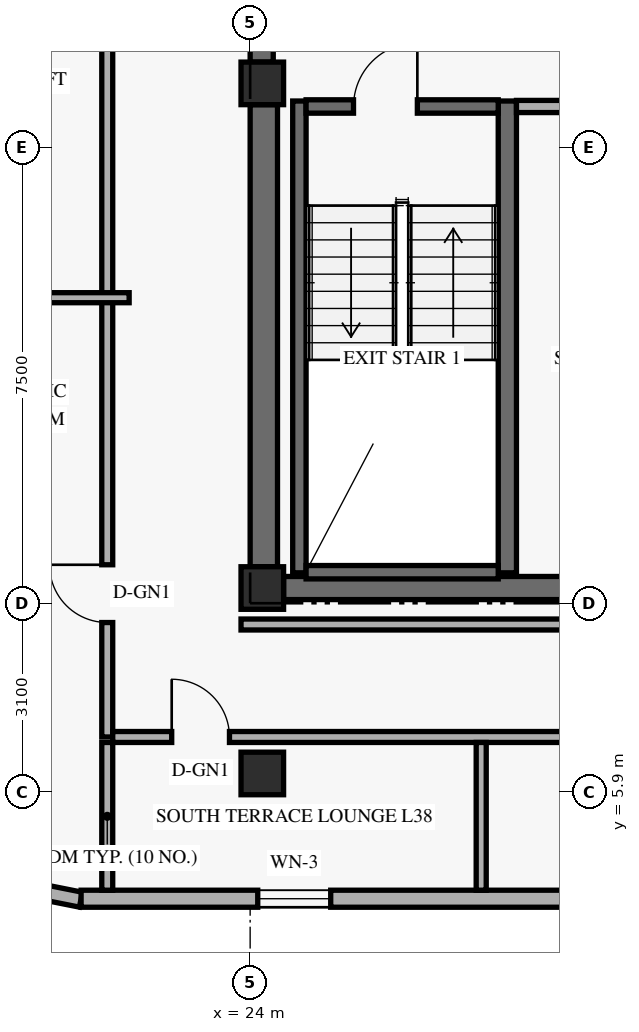
"""IFC4 building model, lengths in metres.
Left out: names, types, materials, properties, quantities, classifications, styles, units other than length and angle.
Written with IfcOpenShell. Run it as: python <this file> out.ifc"""

import sys

from ifc_helpers import new_model, si_unit, direction, frame, frame_2d, origin, origin_2d, place, context, subcontext, project, spatial, rectangle, extrude, element, fill, save


model = new_model("IFC4")
c1 = context("Model", 3, precision=1e-05, world=origin(), true_north=direction((0.0, 1.0)))
c2 = subcontext(c1, "Body", "Model", "MODEL_VIEW")
j1 = project(units=[si_unit("LENGTHUNIT", "METRE"), si_unit("PLANEANGLEUNIT", "RADIAN")], contexts=[c1])
p1 = place(None, origin())
s1 = spatial("IfcSite", under=j1, at=p1, CompositionType="ELEMENT")
p2 = place(p1, origin())
s2 = spatial("IfcBuilding", under=s1, at=p2, CompositionType="ELEMENT")
p3 = place(p2, frame((0.0, 0.0, 148.2)))
s3 = spatial("IfcBuildingStorey", under=s2, at=p3, CompositionType="ELEMENT", Elevation=148.2)
p4 = place(p3, frame((24.225, 9.6, 0.0), z_axis=(0.0, 0.0, 1.0), x_axis=(0.0, 1.0, 0.0)))
e1 = element("IfcWall", 1, at=p4, inside=s3, PredefinedType="SHEAR", context=c2, shape_type="SweptSolid", body=[
    extrude(rectangle(XDim=7.6, YDim=0.45, at=frame_2d((3.8, 0.0))), origin(), (0.0, 0.0, 1.0), 2.748),
])
p5 = place(p3, frame((24.19, 17.9, 0.0), z_axis=(0.0, 0.0, 1.0), x_axis=(0.0, 1.0, 0.0)))
e2 = element("IfcWall", 2, at=p5, inside=s3, PredefinedType="SHEAR", context=c2, shape_type="SweptSolid", body=[
    extrude(rectangle(XDim=11.95, YDim=0.38, at=frame_2d((5.975, 0.0))), origin(), (0.0, 0.0, 1.0), 2.748),
])
p6 = place(p3, frame((24.55, 9.25, 0.0), z_axis=(0.0, 0.0, 1.0), x_axis=(1.0, 0.0, 0.0)))
e3 = element("IfcWall", 3, at=p6, inside=s3, PredefinedType="SHEAR", context=c2, shape_type="SweptSolid", body=[
    extrude(rectangle(XDim=10.3, YDim=0.38, at=frame_2d((5.15, 0.0))), origin(), (0.0, 0.0, 1.0), 3.36),
])
p7 = place(p6, frame((5.2, 0.0, 0.0)))
e4 = element("IfcOpeningElement", 4, at=p7, cuts=e3, PredefinedType="OPENING", context=c2, shape_type="SweptSolid", body=[
    extrude(rectangle(XDim=1.05, YDim=2.15, at=frame_2d((0.525, 1.075))), frame((0.0, 0.2, 0.0), z_axis=(0.0, -1.0, 0.0), x_axis=(1.0, 0.0, 0.0)), (0.0, 0.0, 1.0), 0.4),
])
p8 = place(p3, frame((24.81, 9.5, 0.0), z_axis=(0.0, 0.0, 1.0), x_axis=(0.0, 1.0, 0.0)))
e5 = element("IfcWall", 5, at=p8, inside=s3, PredefinedType="SHEAR", context=c2, shape_type="SweptSolid", body=[
    extrude(rectangle(XDim=7.76, YDim=0.22, at=frame_2d((3.88, 0.0))), origin(), (0.0, 0.0, 1.0), 3.36),
])
p9 = place(p3, frame((28.23, 9.5, 0.0), z_axis=(0.0, 0.0, 1.0), x_axis=(0.0, 1.0, 0.0)))
e6 = element("IfcWall", 6, at=p9, inside=s3, PredefinedType="SHEAR", context=c2, shape_type="SweptSolid", body=[
    extrude(rectangle(XDim=7.76, YDim=0.3, at=frame_2d((3.88, 0.0))), origin(), (0.0, 0.0, 1.0), 3.36),
])
p10 = place(p3, frame((24.92, 9.51, 0.0), z_axis=(0.0, 0.0, 1.0), x_axis=(1.0, 0.0, 0.0)))
e7 = element("IfcWall", 7, at=p10, inside=s3, PredefinedType="SHEAR", context=c2, shape_type="SweptSolid", body=[
    extrude(rectangle(XDim=3.16, YDim=0.22, at=frame_2d((1.58, 0.0))), origin(), (0.0, 0.0, 1.0), 3.36),
])
p11 = place(p3, frame((24.92, 17.17, 0.0), z_axis=(0.0, 0.0, 1.0), x_axis=(1.0, 0.0, 0.0)))
e8 = element("IfcWall", 8, at=p11, inside=s3, PredefinedType="SHEAR", context=c2, shape_type="SweptSolid", body=[
    extrude(rectangle(XDim=3.16, YDim=0.22, at=frame_2d((1.58, 0.0))), origin(), (0.0, 0.0, 1.0), 3.36),
])
p12 = place(p11, frame((0.78, 0.0, 0.0)))
e9 = element("IfcOpeningElement", 9, at=p12, cuts=e8, PredefinedType="OPENING", context=c2, shape_type="SweptSolid", body=[
    extrude(rectangle(XDim=1.05, YDim=2.15, at=frame_2d((0.525, 1.075))), frame((0.0, 0.12, 0.0), z_axis=(0.0, -1.0, 0.0), x_axis=(1.0, 0.0, 0.0)), (0.0, 0.0, 1.0), 0.24),
])
for number, where, z_axis, x_axis in (
    (10, (24.2, 6.2, 0.0), (0.0, 0.0, 1.0), (1.0, 0.0, 0.0)),
    (11, (24.2, 9.25, 0.0), (0.0, 0.0, 1.0), (1.0, 0.0, 0.0)),
    (12, (24.2, 17.55, 0.0), (0.0, 0.0, 1.0), (1.0, 0.0, 0.0)),
):
    element("IfcColumn", number, at=place(p3, frame(where, z_axis=z_axis, x_axis=x_axis)), inside=s3, PredefinedType="COLUMN", context=c2, shape_type="SweptSolid", body=[
        extrude(rectangle(XDim=0.7, YDim=0.7, at=origin_2d()), origin(), (0.0, 0.0, 1.0), 3.6),
    ])
p13 = place(p3, frame((19.854, 4.395, 0.0), z_axis=(0.0, 0.0, 1.0), x_axis=(0.980809899341, -0.19496651342, 0.0)))
e13 = element("IfcWall", 13, at=p13, inside=s3, PredefinedType="SOLIDWALL", context=c2, shape_type="SweptSolid", body=[
    extrude(rectangle(XDim=1.389, YDim=0.25, at=frame_2d((0.694, 0.0))), origin(), (0.0, 0.0, 1.0), 3.36),
])
p14 = place(p3, frame((21.22, 4.14, 0.0), z_axis=(0.0, 0.0, 1.0), x_axis=(1.0, 0.0, 0.0)))
e14 = element("IfcWall", 14, at=p14, inside=s3, PredefinedType="SOLIDWALL", context=c2, shape_type="SweptSolid", body=[
    extrude(rectangle(XDim=33.76, YDim=0.28, at=frame_2d((16.88, 0.0))), origin(), (0.0, 0.0, 1.0), 3.36),
])
p15 = place(p14, frame((2.905, 0.0, 0.85)))
e15 = element("IfcOpeningElement", 15, at=p15, cuts=e14, PredefinedType="OPENING", context=c2, shape_type="SweptSolid", body=[
    extrude(rectangle(XDim=1.2, YDim=1.5, at=frame_2d((0.6, 0.75))), frame((0.0, 0.15, 0.0), z_axis=(0.0, -1.0, 0.0), x_axis=(1.0, 0.0, 0.0)), (0.0, 0.0, 1.0), 0.3),
])
p16 = place(p14, frame((9.79, 0.0, 0.85)))
e16 = element("IfcOpeningElement", 16, at=p16, cuts=e14, PredefinedType="OPENING", context=c2, shape_type="SweptSolid", body=[
    extrude(rectangle(XDim=1.2, YDim=1.5, at=frame_2d((0.6, 0.75))), frame((0.0, 0.15, 0.0), z_axis=(0.0, -1.0, 0.0), x_axis=(1.0, 0.0, 0.0)), (0.0, 0.0, 1.0), 0.3),
])
p17 = place(p14, frame((15.065, 0.0, 0.85)))
e17 = element("IfcOpeningElement", 17, at=p17, cuts=e14, PredefinedType="OPENING", context=c2, shape_type="SweptSolid", body=[
    extrude(rectangle(XDim=1.2, YDim=1.5, at=frame_2d((0.6, 0.75))), frame((0.0, 0.15, 0.0), z_axis=(0.0, -1.0, 0.0), x_axis=(1.0, 0.0, 0.0)), (0.0, 0.0, 1.0), 0.3),
])
p18 = place(p14, frame((19.625, 0.0, 0.85)))
e18 = element("IfcOpeningElement", 18, at=p18, cuts=e14, PredefinedType="OPENING", context=c2, shape_type="SweptSolid", body=[
    extrude(rectangle(XDim=1.2, YDim=1.5, at=frame_2d((0.6, 0.75))), frame((0.0, 0.15, 0.0), z_axis=(0.0, -1.0, 0.0), x_axis=(1.0, 0.0, 0.0)), (0.0, 0.0, 1.0), 0.3),
])
p19 = place(p14, frame((24.45, 0.0, 0.85)))
e19 = element("IfcOpeningElement", 19, at=p19, cuts=e14, PredefinedType="OPENING", context=c2, shape_type="SweptSolid", body=[
    extrude(rectangle(XDim=1.2, YDim=1.5, at=frame_2d((0.6, 0.75))), frame((0.0, 0.15, 0.0), z_axis=(0.0, -1.0, 0.0), x_axis=(1.0, 0.0, 0.0)), (0.0, 0.0, 1.0), 0.3),
])
p20 = place(p14, frame((27.08, 0.0, 0.85)))
e20 = element("IfcOpeningElement", 20, at=p20, cuts=e14, PredefinedType="OPENING", context=c2, shape_type="SweptSolid", body=[
    extrude(rectangle(XDim=1.2, YDim=1.5, at=frame_2d((0.6, 0.75))), frame((0.0, 0.15, 0.0), z_axis=(0.0, -1.0, 0.0), x_axis=(1.0, 0.0, 0.0)), (0.0, 0.0, 1.0), 0.3),
])
p21 = place(p14, frame((30.57, 0.0, 0.85)))
e21 = element("IfcOpeningElement", 21, at=p21, cuts=e14, PredefinedType="OPENING", context=c2, shape_type="SweptSolid", body=[
    extrude(rectangle(XDim=1.2, YDim=1.5, at=frame_2d((0.6, 0.75))), frame((0.0, 0.15, 0.0), z_axis=(0.0, -1.0, 0.0), x_axis=(1.0, 0.0, 0.0)), (0.0, 0.0, 1.0), 0.3),
])
p22 = place(p3, frame((28.38, 17.17, 0.0), z_axis=(0.0, 0.0, 1.0), x_axis=(1.0, 0.0, 0.0)))
e22 = element("IfcWall", 22, at=p22, inside=s3, PredefinedType="STANDARD", context=c2, shape_type="SweptSolid", body=[
    extrude(rectangle(XDim=2.9, YDim=0.2, at=frame_2d((1.45, 0.0))), origin(), (0.0, 0.0, 1.0), 3.36),
])
p23 = place(p3, frame((21.65, 6.8, 0.0), z_axis=(0.0, 0.0, 1.0), x_axis=(0.0, 1.0, 0.0)))
e23 = element("IfcWall", 23, at=p23, inside=s3, PredefinedType="STANDARD", context=c2, shape_type="SweptSolid", body=[
    extrude(rectangle(XDim=34.4, YDim=0.18, at=frame_2d((17.2, 0.0))), origin(), (0.0, 0.0, 1.0), 2.73),
])
p24 = place(p23, frame((1.883, 0.0, 0.0)))
e24 = element("IfcOpeningElement", 24, at=p24, cuts=e23, PredefinedType="OPENING", context=c2, shape_type="SweptSolid", body=[
    extrude(rectangle(XDim=0.95, YDim=2.15, at=frame_2d((0.475, 1.075))), frame((0.0, 0.1, 0.0), z_axis=(0.0, -1.0, 0.0), x_axis=(1.0, 0.0, 0.0)), (0.0, 0.0, 1.0), 0.2),
])
p25 = place(p23, frame((12.117, 0.0, 0.0)))
e25 = element("IfcOpeningElement", 25, at=p25, cuts=e23, PredefinedType="OPENING", context=c2, shape_type="SweptSolid", body=[
    extrude(rectangle(XDim=0.95, YDim=2.15, at=frame_2d((0.475, 1.075))), frame((0.0, 0.1, 0.0), z_axis=(0.0, -1.0, 0.0), x_axis=(1.0, 0.0, 0.0)), (0.0, 0.0, 1.0), 0.2),
])
p26 = place(p23, frame((22.357, 0.0, 0.0)))
e26 = element("IfcOpeningElement", 26, at=p26, cuts=e23, PredefinedType="OPENING", context=c2, shape_type="SweptSolid", body=[
    extrude(rectangle(XDim=0.95, YDim=2.15, at=frame_2d((0.475, 1.075))), frame((0.0, 0.1, 0.0), z_axis=(0.0, -1.0, 0.0), x_axis=(1.0, 0.0, 0.0)), (0.0, 0.0, 1.0), 0.2),
])
p27 = place(p23, frame((31.792, 0.0, 0.0)))
e27 = element("IfcOpeningElement", 27, at=p27, cuts=e23, PredefinedType="OPENING", context=c2, shape_type="SweptSolid", body=[
    extrude(rectangle(XDim=0.95, YDim=2.15, at=frame_2d((0.475, 1.075))), frame((0.0, 0.1, 0.0), z_axis=(0.0, -1.0, 0.0), x_axis=(1.0, 0.0, 0.0)), (0.0, 0.0, 1.0), 0.2),
])
p28 = place(p3, frame((21.74, 6.8, 0.0), z_axis=(0.0, 0.0, 1.0), x_axis=(1.0, 0.0, 0.0)))
e28 = element("IfcWall", 28, at=p28, inside=s3, PredefinedType="STANDARD", context=c2, shape_type="SweptSolid", body=[
    extrude(rectangle(XDim=13.68, YDim=0.18, at=frame_2d((6.84, 0.0))), origin(), (0.0, 0.0, 1.0), 2.73),
])
p29 = place(p28, frame((0.97, 0.0, 0.0)))
e29 = element("IfcOpeningElement", 29, at=p29, cuts=e28, PredefinedType="OPENING", context=c2, shape_type="SweptSolid", body=[
    extrude(rectangle(XDim=0.95, YDim=2.15, at=frame_2d((0.475, 1.075))), frame((0.0, 0.1, 0.0), z_axis=(0.0, -1.0, 0.0), x_axis=(1.0, 0.0, 0.0)), (0.0, 0.0, 1.0), 0.2),
])
p30 = place(p28, frame((9.11, 0.0, 0.0)))
e30 = element("IfcOpeningElement", 30, at=p30, cuts=e28, PredefinedType="OPENING", context=c2, shape_type="SweptSolid", body=[
    extrude(rectangle(XDim=0.95, YDim=2.15, at=frame_2d((0.475, 1.075))), frame((0.0, 0.1, 0.0), z_axis=(0.0, -1.0, 0.0), x_axis=(1.0, 0.0, 0.0)), (0.0, 0.0, 1.0), 0.2),
])
p31 = place(p3, frame((23.85, 8.65, 0.0), z_axis=(0.0, 0.0, 1.0), x_axis=(1.0, 0.0, 0.0)))
e31 = element("IfcWall", 31, at=p31, inside=s3, PredefinedType="STANDARD", context=c2, shape_type="SweptSolid", body=[
    extrude(rectangle(XDim=11.57, YDim=0.18, at=frame_2d((5.785, 0.0))), origin(), (0.0, 0.0, 1.0), 2.73),
])
p32 = place(p3, frame((21.65, 4.28, 0.0), z_axis=(0.0, 0.0, 1.0), x_axis=(0.0, 1.0, 0.0)))
e32 = element("IfcWall", 32, at=p32, inside=s3, PredefinedType="PARTITIONING", context=c2, shape_type="SweptSolid", body=[
    extrude(rectangle(XDim=2.43, YDim=0.18, at=frame_2d((1.215, 0.0))), origin(), (0.0, 0.0, 1.0), 2.879),
])
p33 = place(p3, frame((17.88, 14.025, 0.0), z_axis=(0.0, 0.0, 1.0), x_axis=(1.0, 0.0, 0.0)))
e33 = element("IfcWall", 33, at=p33, inside=s3, PredefinedType="PARTITIONING", context=c2, shape_type="SweptSolid", body=[
    extrude(rectangle(XDim=4.13, YDim=0.165, at=frame_2d((2.065, 0.0))), origin(), (0.0, 0.0, 1.0), 2.879),
])
p34 = place(p3, frame((27.8, 4.28, 0.0), z_axis=(0.0, 0.0, 1.0), x_axis=(0.0, 1.0, 0.0)))
e34 = element("IfcWall", 34, at=p34, inside=s3, PredefinedType="PARTITIONING", context=c2, shape_type="SweptSolid", body=[
    extrude(rectangle(XDim=2.43, YDim=0.165, at=frame_2d((1.215, 0.0))), origin(), (0.0, 0.0, 1.0), 2.879),
])
p35 = place(p15, origin())
e35 = element("IfcWindow", 35, at=p35, inside=s3, PartitioningType="SINGLE_PANEL", PredefinedType="WINDOW", context=c2, shape_type="SweptSolid", body=[
    extrude(rectangle(XDim=1.2, YDim=1.5, at=frame_2d((0.6, 0.75))), frame((0.0, 0.03, 0.0), z_axis=(0.0, -1.0, 0.0), x_axis=(1.0, 0.0, 0.0)), (0.0, 0.0, 1.0), 0.06),
])
fill(e15, e35)
p36 = place(p12, frame((1.05, 0.0, 0.0), z_axis=(0.0, 0.0, 1.0), x_axis=(-1.0, 0.0, 0.0)))
e36 = element("IfcDoor", 36, at=p36, inside=s3, OperationType="SINGLE_SWING_LEFT", PredefinedType="DOOR", context=c2, shape_type="SweptSolid", body=[
    extrude(rectangle(XDim=1.05, YDim=2.15, at=frame_2d((0.525, 1.075))), frame((0.0, 0.025, 0.0), z_axis=(0.0, -1.0, 0.0), x_axis=(1.0, 0.0, 0.0)), (0.0, 0.0, 1.0), 0.05),
])
fill(e9, e36)
p37 = place(p24, origin())
e37 = element("IfcDoor", 37, at=p37, inside=s3, OperationType="SINGLE_SWING_RIGHT", PredefinedType="DOOR", context=c2, shape_type="SweptSolid", body=[
    extrude(rectangle(XDim=0.95, YDim=2.15, at=frame_2d((0.475, 1.075))), frame((0.0, 0.025, 0.0), z_axis=(0.0, -1.0, 0.0), x_axis=(1.0, 0.0, 0.0)), (0.0, 0.0, 1.0), 0.05),
])
fill(e24, e37)
p38 = place(p29, origin())
e38 = element("IfcDoor", 38, at=p38, inside=s3, OperationType="SINGLE_SWING_LEFT", PredefinedType="DOOR", context=c2, shape_type="SweptSolid", body=[
    extrude(rectangle(XDim=0.95, YDim=2.15, at=frame_2d((0.475, 1.075))), frame((0.0, 0.025, 0.0), z_axis=(0.0, -1.0, 0.0), x_axis=(1.0, 0.0, 0.0)), (0.0, 0.0, 1.0), 0.05),
])
fill(e29, e38)
save(model, sys.argv[1])
